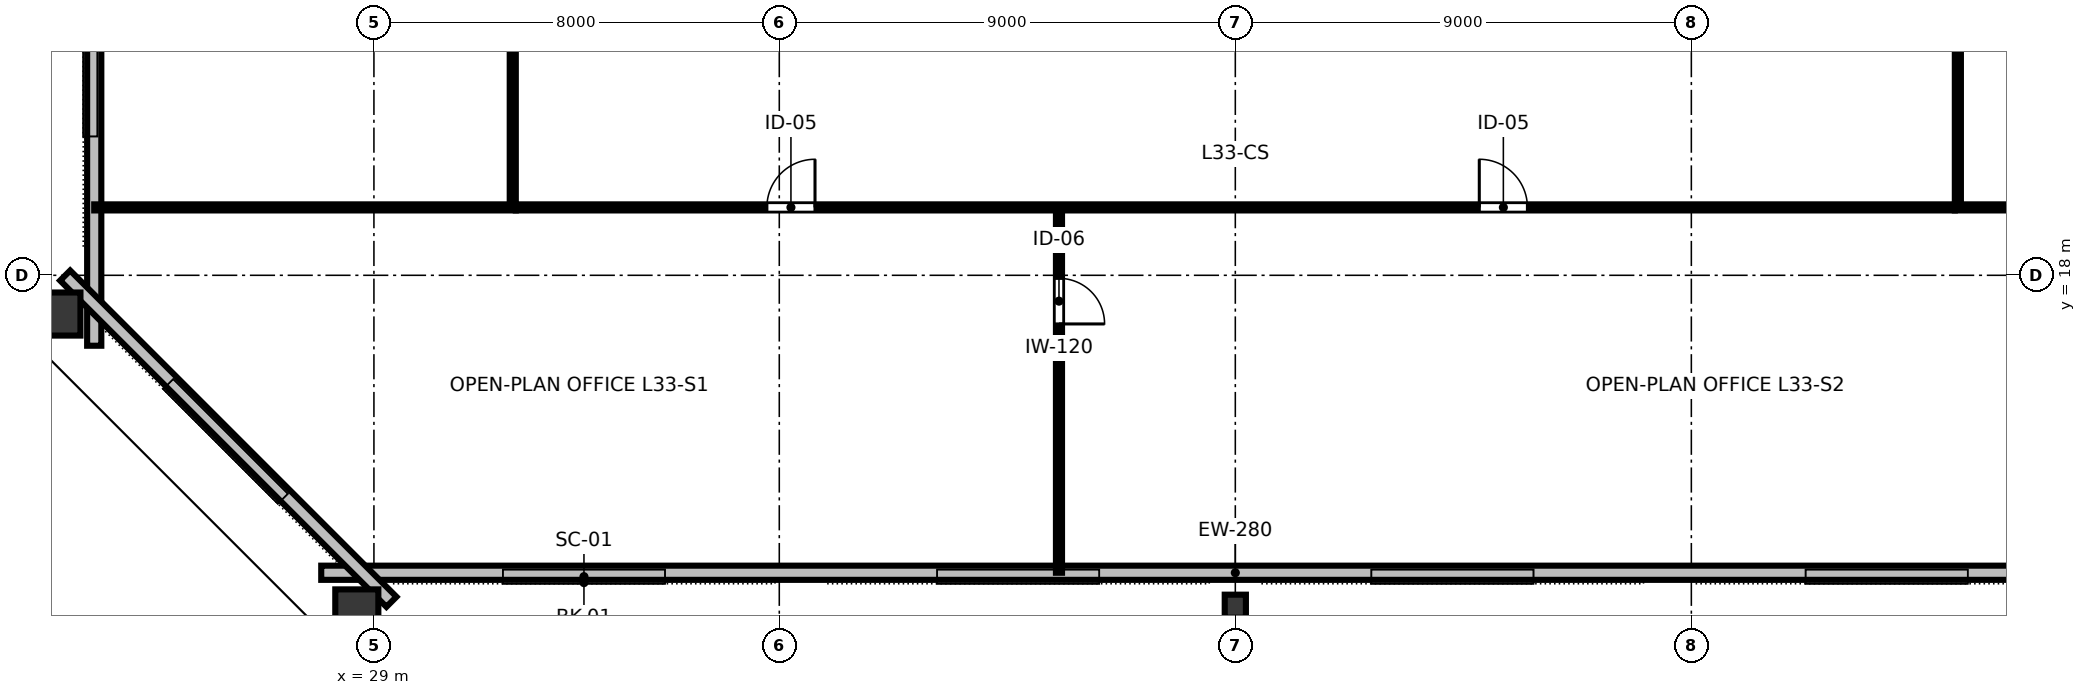
"""IFC4 building model, lengths in metres.
Left out: names, types, materials, properties, quantities, classifications, styles, units other than length and angle.
Written with IfcOpenShell. Run it as: python <this file> out.ifc"""

import sys

from ifc_helpers import new_model, si_unit, direction, frame, frame_2d, origin, origin_2d, place, context, subcontext, project, spatial, rectangle, hollow_rectangle, i_section, extrude, element, fill, save


model = new_model("IFC4")
c1 = context("Model", 3, precision=1e-05, world=origin(), true_north=direction((0.0, 1.0)))
c2 = subcontext(c1, "Body", "Model", "MODEL_VIEW")
j1 = project(units=[si_unit("LENGTHUNIT", "METRE"), si_unit("PLANEANGLEUNIT", "RADIAN")], contexts=[c1])
p1 = place(None, origin())
s1 = spatial("IfcSite", under=j1, at=p1, CompositionType="ELEMENT")
p2 = place(p1, origin())
s2 = spatial("IfcBuilding", under=s1, at=p2, CompositionType="ELEMENT")
p3 = place(p2, frame((0.0, 0.0, 127.6)))
s3 = spatial("IfcBuildingStorey", under=s2, at=p3, CompositionType="ELEMENT", Elevation=127.6)
p4 = place(p3, frame((28.662, 11.302, 0.0), z_axis=(0.0, 0.0, 1.0), x_axis=(1.0, 0.0, 0.0)))
e1 = element("IfcColumn", 1, at=p4, inside=s3, PredefinedType="COLUMN", context=c2, shape_type="SweptSolid", body=[
    extrude(hollow_rectangle(XDim=0.85, YDim=1.0, WallThickness=0.05, at=origin_2d()), origin(), (0.0, 0.0, 1.0), 3.358),
])
p5 = place(p3, frame((46.0, 11.47, 0.0), z_axis=(0.0, 0.0, 1.0), x_axis=(1.0, 0.0, 0.0)))
e2 = element("IfcColumn", 2, at=p5, inside=s3, PredefinedType="COLUMN", context=c2, shape_type="SweptSolid", body=[
    extrude(i_section(OverallWidth=0.418, OverallDepth=0.455, WebThickness=0.042, FlangeThickness=0.068, FilletRadius=0.025, at=origin_2d()), origin(), (0.0, 0.0, 1.0), 3.358),
])
p6 = place(p3, frame((22.708, 17.236, 0.0), z_axis=(0.0, 0.0, 1.0), x_axis=(0.0, 1.0, 0.0)))
e3 = element("IfcColumn", 3, at=p6, inside=s3, PredefinedType="COLUMN", context=c2, shape_type="SweptSolid", body=[
    extrude(hollow_rectangle(XDim=0.85, YDim=1.0, WallThickness=0.05, at=origin_2d()), origin(), (0.0, 0.0, 1.0), 3.358),
])
p7 = place(p3, frame((27.96, 12.13, 0.0), z_axis=(0.0, 0.0, 1.0), x_axis=(1.0, 0.0, 0.0)))
e4 = element("IfcWall", 4, at=p7, inside=s3, PredefinedType="STANDARD", context=c2, shape_type="SweptSolid", body=[
    extrude(rectangle(XDim=36.08, YDim=0.28, at=frame_2d((18.04, 0.0))), origin(), (0.0, 0.0, 1.0), 3.36),
])
p8 = place(p3, frame((23.48, 47.39, 0.0), z_axis=(0.0, 0.0, 1.0), x_axis=(0.0, -1.0, 0.0)))
e5 = element("IfcWall", 5, at=p8, inside=s3, PredefinedType="STANDARD", context=c2, shape_type="SweptSolid", body=[
    extrude(rectangle(XDim=30.78, YDim=0.28, at=frame_2d((15.39, 0.0))), origin(), (0.0, 0.0, 1.0), 3.36),
])
p9 = place(p3, frame((22.906, 17.996, 0.0), z_axis=(0.0, 0.0, 1.0), x_axis=(0.707106781187, -0.707106781187, 0.0)))
e6 = element("IfcWall", 6, at=p9, inside=s3, PredefinedType="STANDARD", context=c2, shape_type="SweptSolid", body=[
    extrude(rectangle(XDim=9.107, YDim=0.28, at=frame_2d((4.553, 0.0))), origin(), (0.0, 0.0, 1.0), 3.36),
])
p10 = place(p3, frame((42.52, 19.34, 0.0), z_axis=(0.0, 0.0, 1.0), x_axis=(0.0, -1.0, 0.0)))
e7 = element("IfcWall", 7, at=p10, inside=s3, PredefinedType="PARTITIONING", context=c2, shape_type="SweptSolid", body=[
    extrude(rectangle(XDim=7.21, YDim=0.12, at=frame_2d((3.605, 0.0))), origin(), (0.0, 0.0, 1.0), 2.64),
])
p11 = place(p10, frame((1.4, 0.0, 0.0)))
e8 = element("IfcOpeningElement", 8, at=p11, cuts=e7, PredefinedType="OPENING", context=c2, shape_type="SweptSolid", body=[
    extrude(rectangle(XDim=0.9, YDim=2.15, at=frame_2d((0.45, 1.075))), frame((0.0, 0.07, 0.0), z_axis=(0.0, -1.0, 0.0), x_axis=(1.0, 0.0, 0.0)), (0.0, 0.0, 1.0), 0.14),
])
p12 = place(p3, frame((31.8, 19.34, 0.0), z_axis=(0.0, 0.0, 1.0), x_axis=(1.0, 0.0, 0.0)))
e9 = element("IfcWall", 9, at=p12, inside=s3, PredefinedType="PARTITIONING", context=c2, shape_type="SweptSolid", body=[
    extrude(rectangle(XDim=28.4, YDim=0.12, at=frame_2d((14.2, 0.0))), origin(), (0.0, 0.0, 1.0), 2.64),
])
p13 = place(p12, frame((4.955, 0.0, 0.0)))
e10 = element("IfcOpeningElement", 10, at=p13, cuts=e9, PredefinedType="OPENING", context=c2, shape_type="SweptSolid", body=[
    extrude(rectangle(XDim=0.95, YDim=2.15, at=frame_2d((0.475, 1.075))), frame((0.0, 0.07, 0.0), z_axis=(0.0, -1.0, 0.0), x_axis=(1.0, 0.0, 0.0)), (0.0, 0.0, 1.0), 0.14),
])
p14 = place(p12, frame((19.015, 0.0, 0.0)))
e11 = element("IfcOpeningElement", 11, at=p14, cuts=e9, PredefinedType="OPENING", context=c2, shape_type="SweptSolid", body=[
    extrude(rectangle(XDim=0.95, YDim=2.15, at=frame_2d((0.475, 1.075))), frame((0.0, 0.07, 0.0), z_axis=(0.0, -1.0, 0.0), x_axis=(1.0, 0.0, 0.0)), (0.0, 0.0, 1.0), 0.14),
])
p15 = place(p3, frame((31.74, 19.4, 0.0), z_axis=(0.0, 0.0, 1.0), x_axis=(0.0, 1.0, 0.0)))
e12 = element("IfcWall", 12, at=p15, inside=s3, PredefinedType="PARTITIONING", context=c2, shape_type="SweptSolid", body=[
    extrude(rectangle(XDim=11.58, YDim=0.12, at=frame_2d((5.79, 0.0))), origin(), (0.0, 0.0, 1.0), 2.64),
])
p16 = place(p15, frame((5.415, 0.0, 0.0)))
e13 = element("IfcOpeningElement", 13, at=p16, cuts=e12, PredefinedType="OPENING", context=c2, shape_type="SweptSolid", body=[
    extrude(rectangle(XDim=0.95, YDim=2.15, at=frame_2d((0.475, 1.075))), frame((0.0, 0.07, 0.0), z_axis=(0.0, -1.0, 0.0), x_axis=(1.0, 0.0, 0.0)), (0.0, 0.0, 1.0), 0.14),
])
p17 = place(p3, frame((60.26, 19.4, 0.0), z_axis=(0.0, 0.0, 1.0), x_axis=(0.0, 1.0, 0.0)))
e14 = element("IfcWall", 14, at=p17, inside=s3, PredefinedType="PARTITIONING", context=c2, shape_type="SweptSolid", body=[
    extrude(rectangle(XDim=11.58, YDim=0.12, at=frame_2d((5.79, 0.0))), origin(), (0.0, 0.0, 1.0), 2.64),
])
p18 = place(p17, frame((3.925, 0.0, 0.0)))
e15 = element("IfcOpeningElement", 15, at=p18, cuts=e14, PredefinedType="OPENING", context=c2, shape_type="SweptSolid", body=[
    extrude(rectangle(XDim=0.95, YDim=2.15, at=frame_2d((0.475, 1.075))), frame((0.0, 0.07, 0.0), z_axis=(0.0, -1.0, 0.0), x_axis=(1.0, 0.0, 0.0)), (0.0, 0.0, 1.0), 0.14),
])
p19 = place(p17, frame((9.615, 0.0, 0.0)))
e16 = element("IfcOpeningElement", 16, at=p19, cuts=e14, PredefinedType="OPENING", context=c2, shape_type="SweptSolid", body=[
    extrude(rectangle(XDim=0.95, YDim=2.15, at=frame_2d((0.475, 1.075))), frame((0.0, 0.07, 0.0), z_axis=(0.0, -1.0, 0.0), x_axis=(1.0, 0.0, 0.0)), (0.0, 0.0, 1.0), 0.14),
])
for number, where, z_axis, x_axis in (
    (17, (31.8, 19.34, 0.0), (0.0, 0.0, 1.0), (-1.0, 0.0, 0.0)),
    (18, (60.2, 19.34, 0.0), (0.0, 0.0, 1.0), (1.0, 0.0, 0.0)),
):
    element("IfcWall", number, at=place(p3, frame(where, z_axis=z_axis, x_axis=x_axis)), inside=s3, PredefinedType="PARTITIONING", context=c2, shape_type="SweptSolid", body=[
        extrude(rectangle(XDim=8.32, YDim=0.12, at=frame_2d((4.16, 0.0))), origin(), (0.0, 0.0, 1.0), 2.64),
    ])
p20 = place(p11, origin())
e19 = element("IfcDoor", 19, at=p20, inside=s3, OperationType="SINGLE_SWING_RIGHT", PredefinedType="DOOR", context=c2, shape_type="SweptSolid", body=[
    extrude(rectangle(XDim=0.9, YDim=2.15, at=frame_2d((0.45, 1.075))), frame((0.0, 0.025, 0.0), z_axis=(0.0, -1.0, 0.0), x_axis=(1.0, 0.0, 0.0)), (0.0, 0.0, 1.0), 0.05),
])
fill(e8, e19)
p21 = place(p13, origin())
e20 = element("IfcDoor", 20, at=p21, inside=s3, OperationType="SINGLE_SWING_RIGHT", PredefinedType="DOOR", context=c2, shape_type="SweptSolid", body=[
    extrude(rectangle(XDim=0.95, YDim=2.15, at=frame_2d((0.475, 1.075))), frame((0.0, 0.025, 0.0), z_axis=(0.0, -1.0, 0.0), x_axis=(1.0, 0.0, 0.0)), (0.0, 0.0, 1.0), 0.05),
])
fill(e10, e20)
p22 = place(p14, origin())
e21 = element("IfcDoor", 21, at=p22, inside=s3, OperationType="SINGLE_SWING_LEFT", PredefinedType="DOOR", context=c2, shape_type="SweptSolid", body=[
    extrude(rectangle(XDim=0.95, YDim=2.15, at=frame_2d((0.475, 1.075))), frame((0.0, 0.025, 0.0), z_axis=(0.0, -1.0, 0.0), x_axis=(1.0, 0.0, 0.0)), (0.0, 0.0, 1.0), 0.05),
])
fill(e11, e21)
save(model, sys.argv[1])
